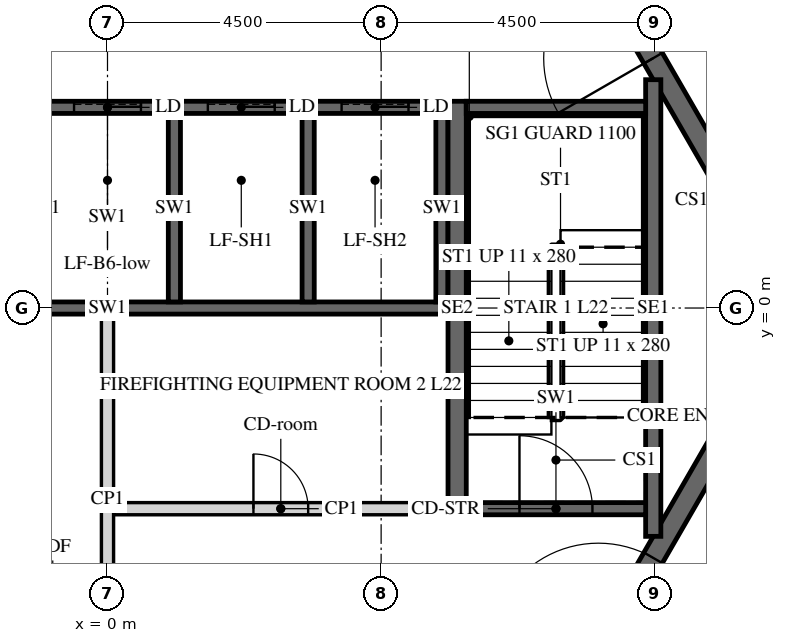
"""IFC4 building model, lengths in metres.
Left out: names, types, materials, properties, quantities, classifications, styles, units other than length and angle.
Written with IfcOpenShell. Run it as: python <this file> out.ifc"""

import sys

from ifc_helpers import new_model, si_unit, direction, frame, frame_2d, origin, place, context, subcontext, project, spatial, polyline, rectangle, outline, extrude, element, fill, save


model = new_model("IFC4")
c1 = context("Model", 3, precision=1e-05, world=origin(), true_north=direction((0.0, 1.0)))
c2 = subcontext(c1, "Body", "Model", "MODEL_VIEW")
j1 = project(units=[si_unit("LENGTHUNIT", "METRE"), si_unit("PLANEANGLEUNIT", "RADIAN")], contexts=[c1])
p1 = place(None, origin())
s1 = spatial("IfcSite", under=j1, at=p1, CompositionType="ELEMENT")
p2 = place(p1, origin())
s2 = spatial("IfcBuilding", under=s1, at=p2, CompositionType="ELEMENT")
p3 = place(p2, frame((0.0, 0.0, 99.9)))
s3 = spatial("IfcBuildingStorey", under=s2, at=p3, CompositionType="ELEMENT", Elevation=99.9)
p4 = place(p3, frame((7.91, -13.7, -0.15), z_axis=(0.0, 0.0, 1.0), x_axis=(0.499999880136, 0.866025472988, 0.0)))
e1 = element("IfcWall", 1, at=p4, inside=s3, PredefinedType="SHEAR", context=c2, shape_type="SweptSolid", body=[
    extrude(outline(polyline([(-0.173, -0.3), (15.993, -0.3), (15.646, 0.3), (0.173, 0.3), (-0.173, -0.3)])), origin(), (0.0, 0.0, 1.0), 3.9),
])
p5 = place(p4, frame((7.039, 0.0, 0.15)))
e2 = element("IfcOpeningElement", 2, at=p5, cuts=e1, PredefinedType="OPENING", context=c2, shape_type="SweptSolid", body=[
    extrude(rectangle(XDim=1.8, YDim=2.4, at=frame_2d((0.9, 1.2))), frame((0.0, 0.31, 0.0), z_axis=(0.0, -1.0, 0.0), x_axis=(1.0, 0.0, 0.0)), (0.0, 0.0, 1.0), 0.62),
])
p6 = place(p3, frame((15.819, 0.0, -0.15), z_axis=(0.0, 0.0, 1.0), x_axis=(-0.499999880136, 0.866025472988, 0.0)))
e3 = element("IfcWall", 3, at=p6, inside=s3, PredefinedType="SHEAR", context=c2, shape_type="SweptSolid", body=[
    extrude(outline(polyline([(-0.173, -0.3), (15.993, -0.3), (15.646, 0.3), (0.173, 0.3), (-0.173, -0.3)])), origin(), (0.0, 0.0, 1.0), 3.9),
])
p7 = place(p6, frame((6.981, 0.0, 0.15)))
e4 = element("IfcOpeningElement", 4, at=p7, cuts=e3, PredefinedType="OPENING", context=c2, shape_type="SweptSolid", body=[
    extrude(rectangle(XDim=1.8, YDim=2.4, at=frame_2d((0.9, 1.2))), frame((0.0, 0.31, 0.0), z_axis=(0.0, -1.0, 0.0), x_axis=(1.0, 0.0, 0.0)), (0.0, 0.0, 1.0), 0.62),
])
p8 = place(p3, frame((5.673, -9.825, -0.15), z_axis=(0.0, 0.0, 1.0), x_axis=(0.499995046907, 0.866028263435, 0.0)))
e5 = element("IfcWall", 5, at=p8, inside=s3, PredefinedType="SHEAR", context=c2, shape_type="SweptSolid", body=[
    extrude(outline(polyline([(-0.101, -0.175), (11.446, -0.175), (11.244, 0.175), (0.101, 0.175), (-0.101, -0.175)])), origin(), (0.0, 0.0, 1.0), 3.9),
])
p9 = place(p8, frame((4.801, 0.0, 0.15)))
e6 = element("IfcOpeningElement", 6, at=p9, cuts=e5, PredefinedType="OPENING", context=c2, shape_type="SweptSolid", body=[
    extrude(rectangle(XDim=1.8, YDim=2.4, at=frame_2d((0.9, 1.2))), frame((0.0, 0.185, 0.0), z_axis=(0.0, -1.0, 0.0), x_axis=(1.0, 0.0, 0.0)), (0.0, 0.0, 1.0), 0.37),
])
p10 = place(p3, frame((11.345, 0.0, -0.15), z_axis=(0.0, 0.0, 1.0), x_axis=(-0.499995046907, 0.866028263435, 0.0)))
e7 = element("IfcWall", 7, at=p10, inside=s3, PredefinedType="SHEAR", context=c2, shape_type="SweptSolid", body=[
    extrude(outline(polyline([(-0.101, -0.175), (11.446, -0.175), (11.244, 0.175), (0.101, 0.175), (-0.101, -0.175)])), origin(), (0.0, 0.0, 1.0), 3.9),
])
p11 = place(p10, frame((4.744, 0.0, 0.15)))
e8 = element("IfcOpeningElement", 8, at=p11, cuts=e7, PredefinedType="OPENING", context=c2, shape_type="SweptSolid", body=[
    extrude(rectangle(XDim=1.8, YDim=2.4, at=frame_2d((0.9, 1.2))), frame((0.0, 0.185, 0.0), z_axis=(0.0, -1.0, 0.0), x_axis=(1.0, 0.0, 0.0)), (0.0, 0.0, 1.0), 0.37),
])
p12 = place(p3, frame((-5.6, 3.3, -0.25), z_axis=(0.0, 0.0, 1.0), x_axis=(1.0, 0.0, 0.0)))
e9 = element("IfcWall", 9, at=p12, inside=s3, PredefinedType="SHEAR", context=c2, shape_type="SweptSolid", body=[
    extrude(rectangle(XDim=11.2, YDim=0.2, at=frame_2d((5.6, 0.0))), origin(), (0.0, 0.0, 1.0), 3.9),
])
p13 = place(p12, frame((0.65, 0.0, 0.25)))
e10 = element("IfcOpeningElement", 10, at=p13, cuts=e9, PredefinedType="OPENING", context=c2, shape_type="SweptSolid", body=[
    extrude(rectangle(XDim=1.1, YDim=2.1, at=frame_2d((0.55, 1.05))), frame((0.0, 0.11, 0.0), z_axis=(0.0, -1.0, 0.0), x_axis=(1.0, 0.0, 0.0)), (0.0, 0.0, 1.0), 0.22),
])
p14 = place(p12, frame((2.85, 0.0, 0.25)))
e11 = element("IfcOpeningElement", 11, at=p14, cuts=e9, PredefinedType="OPENING", context=c2, shape_type="SweptSolid", body=[
    extrude(rectangle(XDim=1.1, YDim=2.1, at=frame_2d((0.55, 1.05))), frame((0.0, 0.11, 0.0), z_axis=(0.0, -1.0, 0.0), x_axis=(1.0, 0.0, 0.0)), (0.0, 0.0, 1.0), 0.22),
])
p15 = place(p12, frame((5.05, 0.0, 0.25)))
e12 = element("IfcOpeningElement", 12, at=p15, cuts=e9, PredefinedType="OPENING", context=c2, shape_type="SweptSolid", body=[
    extrude(rectangle(XDim=1.1, YDim=2.1, at=frame_2d((0.55, 1.05))), frame((0.0, 0.11, 0.0), z_axis=(0.0, -1.0, 0.0), x_axis=(1.0, 0.0, 0.0)), (0.0, 0.0, 1.0), 0.22),
])
p16 = place(p12, frame((7.25, 0.0, 0.25)))
e13 = element("IfcOpeningElement", 13, at=p16, cuts=e9, PredefinedType="OPENING", context=c2, shape_type="SweptSolid", body=[
    extrude(rectangle(XDim=1.1, YDim=2.1, at=frame_2d((0.55, 1.05))), frame((0.0, 0.11, 0.0), z_axis=(0.0, -1.0, 0.0), x_axis=(1.0, 0.0, 0.0)), (0.0, 0.0, 1.0), 0.22),
])
p17 = place(p12, frame((9.45, 0.0, 0.25)))
e14 = element("IfcOpeningElement", 14, at=p17, cuts=e9, PredefinedType="OPENING", context=c2, shape_type="SweptSolid", body=[
    extrude(rectangle(XDim=1.1, YDim=2.1, at=frame_2d((0.55, 1.05))), frame((0.0, 0.11, 0.0), z_axis=(0.0, -1.0, 0.0), x_axis=(1.0, 0.0, 0.0)), (0.0, 0.0, 1.0), 0.22),
])
p18 = place(p3, frame((-5.6, 0.0, -0.25), z_axis=(0.0, 0.0, 1.0), x_axis=(1.0, 0.0, 0.0)))
e15 = element("IfcWall", 15, at=p18, inside=s3, PredefinedType="SHEAR", context=c2, shape_type="SweptSolid", body=[
    extrude(rectangle(XDim=11.2, YDim=0.2, at=frame_2d((5.6, 0.0))), origin(), (0.0, 0.0, 1.0), 3.9),
])
for number, where, z_axis, x_axis in (
    (16, (1.1, 0.1, -0.25), (0.0, 0.0, 1.0), (0.0, 1.0, 0.0)),
    (17, (3.3, 0.1, -0.25), (0.0, 0.0, 1.0), (0.0, 1.0, 0.0)),
    (18, (5.5, 0.1, -0.25), (0.0, 0.0, 1.0), (0.0, 1.0, 0.0)),
):
    element("IfcWall", number, at=place(p3, frame(where, z_axis=z_axis, x_axis=x_axis)), inside=s3, PredefinedType="SHEAR", context=c2, shape_type="SweptSolid", body=[
        extrude(rectangle(XDim=3.1, YDim=0.2, at=frame_2d((1.55, 0.0))), origin(), (0.0, 0.0, 1.0), 3.9),
    ])
p19 = place(p3, frame((0.1, -3.3, 0.0), z_axis=(0.0, 0.0, 1.0), x_axis=(1.0, 0.0, 0.0)))
e19 = element("IfcWall", 19, at=p19, inside=s3, PredefinedType="PARTITIONING", context=c2, shape_type="SweptSolid", body=[
    extrude(rectangle(XDim=5.5, YDim=0.2, at=frame_2d((2.75, 0.0))), origin(), (0.0, 0.0, 1.0), 3.65),
])
p20 = place(p19, frame((2.3, 0.0, 0.0)))
e20 = element("IfcOpeningElement", 20, at=p20, cuts=e19, PredefinedType="OPENING", context=c2, shape_type="SweptSolid", body=[
    extrude(rectangle(XDim=0.9, YDim=2.1, at=frame_2d((0.45, 1.05))), frame((0.0, 0.11, 0.0), z_axis=(0.0, -1.0, 0.0), x_axis=(1.0, 0.0, 0.0)), (0.0, 0.0, 1.0), 0.22),
])
p21 = place(p3, frame((0.0, -6.2, 0.0), z_axis=(0.0, 0.0, 1.0), x_axis=(0.0, 1.0, 0.0)))
e21 = element("IfcWall", 21, at=p21, inside=s3, PredefinedType="PARTITIONING", context=c2, shape_type="SweptSolid", body=[
    extrude(rectangle(XDim=6.1, YDim=0.2, at=frame_2d((3.05, 0.0))), origin(), (0.0, 0.0, 1.0), 3.65),
])
p22 = place(p3, frame((5.75, -3.4, -0.25), z_axis=(0.0, 0.0, 1.0), x_axis=(0.0, 1.0, 0.0)))
e22 = element("IfcWall", 22, at=p22, inside=s3, PredefinedType="SHEAR", context=c2, shape_type="SweptSolid", body=[
    extrude(rectangle(XDim=6.8, YDim=0.3, at=frame_2d((3.4, 0.0))), origin(), (0.0, 0.0, 1.0), 3.9),
])
p23 = place(p3, frame((8.975, -3.755, -0.25), z_axis=(0.0, 0.0, 1.0), x_axis=(0.0, 1.0, 0.0)))
e23 = element("IfcWall", 23, at=p23, inside=s3, PredefinedType="SHEAR", context=c2, shape_type="SweptSolid", body=[
    extrude(rectangle(XDim=7.51, YDim=0.25, at=frame_2d((3.755, 0.0))), origin(), (0.0, 0.0, 1.0), 3.9),
])
p24 = place(p3, frame((5.9, 3.3, -0.25), z_axis=(0.0, 0.0, 1.0), x_axis=(1.0, 0.0, 0.0)))
e24 = element("IfcWall", 24, at=p24, inside=s3, PredefinedType="SHEAR", context=c2, shape_type="SweptSolid", body=[
    extrude(rectangle(XDim=2.95, YDim=0.2, at=frame_2d((1.475, 0.0))), origin(), (0.0, 0.0, 1.0), 3.9),
])
p25 = place(p3, frame((5.9, -3.3, -0.25), z_axis=(0.0, 0.0, 1.0), x_axis=(1.0, 0.0, 0.0)))
e25 = element("IfcWall", 25, at=p25, inside=s3, PredefinedType="SHEAR", context=c2, shape_type="SweptSolid", body=[
    extrude(rectangle(XDim=2.95, YDim=0.2, at=frame_2d((1.475, 0.0))), origin(), (0.0, 0.0, 1.0), 3.9),
])
p26 = place(p25, frame((0.875, 0.0, 0.25)))
e26 = element("IfcOpeningElement", 26, at=p26, cuts=e25, PredefinedType="OPENING", context=c2, shape_type="SweptSolid", body=[
    extrude(rectangle(XDim=1.2, YDim=2.4, at=frame_2d((0.6, 1.2))), frame((0.0, 0.11, 0.0), z_axis=(0.0, -1.0, 0.0), x_axis=(1.0, 0.0, 0.0)), (0.0, 0.0, 1.0), 0.22),
])
p27 = place(p11, origin())
e27 = element("IfcDoor", 27, at=p27, inside=s3, OperationType="DOUBLE_DOOR_SINGLE_SWING", PredefinedType="DOOR", context=c2, shape_type="SweptSolid", body=[
    extrude(rectangle(XDim=1.8, YDim=2.4, at=frame_2d((0.9, 1.2))), frame((0.0, 0.025, 0.0), z_axis=(0.0, -1.0, 0.0), x_axis=(1.0, 0.0, 0.0)), (0.0, 0.0, 1.0), 0.05),
])
fill(e8, e27)
p28 = place(p9, origin())
e28 = element("IfcDoor", 28, at=p28, inside=s3, OperationType="DOUBLE_DOOR_SINGLE_SWING", PredefinedType="DOOR", context=c2, shape_type="SweptSolid", body=[
    extrude(rectangle(XDim=1.8, YDim=2.4, at=frame_2d((0.9, 1.2))), frame((0.0, 0.025, 0.0), z_axis=(0.0, -1.0, 0.0), x_axis=(1.0, 0.0, 0.0)), (0.0, 0.0, 1.0), 0.05),
])
fill(e6, e28)
p29 = place(p20, origin())
e29 = element("IfcDoor", 29, at=p29, inside=s3, OperationType="SINGLE_SWING_LEFT", PredefinedType="DOOR", context=c2, shape_type="SweptSolid", body=[
    extrude(rectangle(XDim=0.9, YDim=2.1, at=frame_2d((0.45, 1.05))), frame((0.0, 0.025, 0.0), z_axis=(0.0, -1.0, 0.0), x_axis=(1.0, 0.0, 0.0)), (0.0, 0.0, 1.0), 0.05),
])
fill(e20, e29)
p30 = place(p26, origin())
e30 = element("IfcDoor", 30, at=p30, inside=s3, OperationType="SINGLE_SWING_LEFT", PredefinedType="DOOR", context=c2, shape_type="SweptSolid", body=[
    extrude(rectangle(XDim=1.2, YDim=2.4, at=frame_2d((0.6, 1.2))), frame((0.0, 0.025, 0.0), z_axis=(0.0, -1.0, 0.0), x_axis=(1.0, 0.0, 0.0)), (0.0, 0.0, 1.0), 0.05),
])
fill(e26, e30)
p31 = place(p15, origin())
e31 = element("IfcDoor", 31, at=p31, inside=s3, OperationType="SLIDING_TO_LEFT", PredefinedType="DOOR", context=c2, shape_type="SweptSolid", body=[
    extrude(rectangle(XDim=1.1, YDim=2.1, at=frame_2d((0.55, 1.05))), frame((0.0, 0.025, 0.0), z_axis=(0.0, -1.0, 0.0), x_axis=(1.0, 0.0, 0.0)), (0.0, 0.0, 1.0), 0.05),
])
fill(e12, e31)
p32 = place(p16, origin())
e32 = element("IfcDoor", 32, at=p32, inside=s3, OperationType="SLIDING_TO_LEFT", PredefinedType="DOOR", context=c2, shape_type="SweptSolid", body=[
    extrude(rectangle(XDim=1.1, YDim=2.1, at=frame_2d((0.55, 1.05))), frame((0.0, 0.025, 0.0), z_axis=(0.0, -1.0, 0.0), x_axis=(1.0, 0.0, 0.0)), (0.0, 0.0, 1.0), 0.05),
])
fill(e13, e32)
p33 = place(p17, origin())
e33 = element("IfcDoor", 33, at=p33, inside=s3, OperationType="SLIDING_TO_LEFT", PredefinedType="DOOR", context=c2, shape_type="SweptSolid", body=[
    extrude(rectangle(XDim=1.1, YDim=2.1, at=frame_2d((0.55, 1.05))), frame((0.0, 0.025, 0.0), z_axis=(0.0, -1.0, 0.0), x_axis=(1.0, 0.0, 0.0)), (0.0, 0.0, 1.0), 0.05),
])
fill(e14, e33)
save(model, sys.argv[1])
